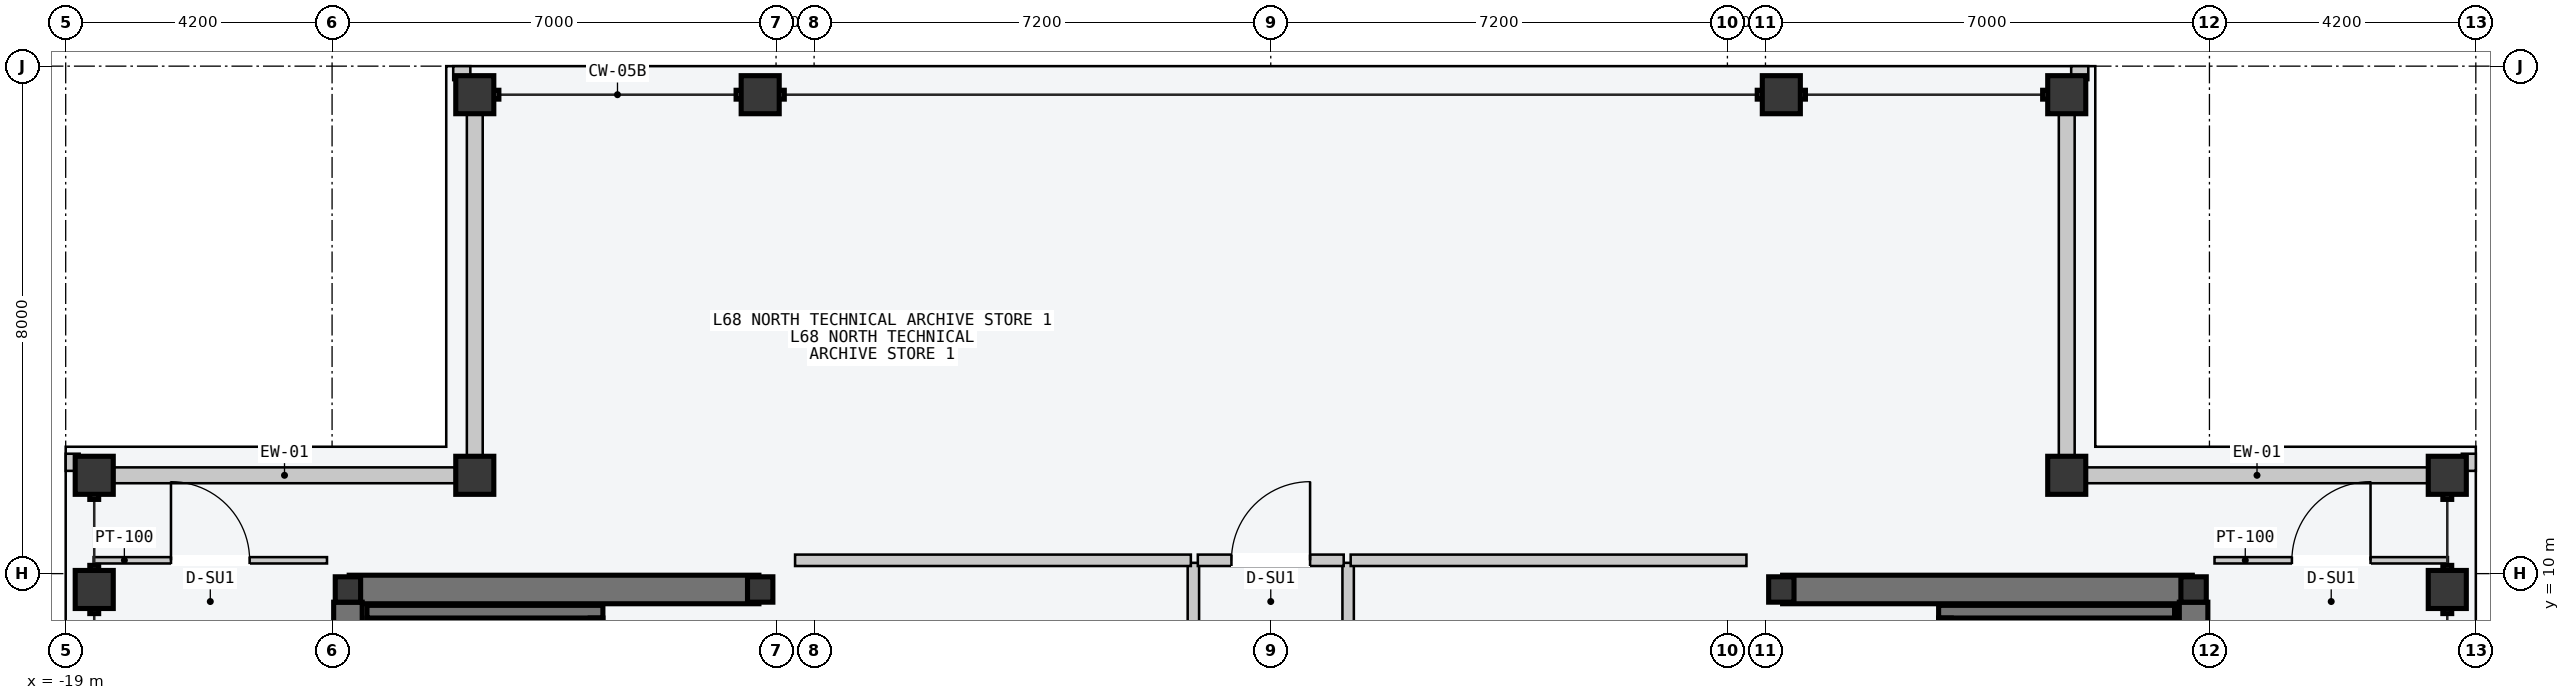
"""IFC4 building model, lengths in metres.
Left out: names, types, materials, properties, quantities, classifications, styles, units other than length and angle.
Written with IfcOpenShell. Run it as: python <this file> out.ifc"""

import sys

from ifc_helpers import new_model, si_unit, direction, frame, frame_2d, origin, origin_2d, place, context, subcontext, project, spatial, rectangle, hollow_rectangle, i_section, extrude, element, fill, save


model = new_model("IFC4")
c1 = context("Model", 3, precision=1e-05, world=origin(), true_north=direction((0.0, 1.0)))
c2 = subcontext(c1, "Body", "Model", "MODEL_VIEW")
j1 = project(units=[si_unit("LENGTHUNIT", "METRE"), si_unit("PLANEANGLEUNIT", "RADIAN")], contexts=[c1])
p1 = place(None, origin())
s1 = spatial("IfcSite", under=j1, at=p1, CompositionType="ELEMENT")
p2 = place(p1, origin())
s2 = spatial("IfcBuilding", under=s1, at=p2, CompositionType="ELEMENT")
p3 = place(p2, frame((0.0, 0.0, 258.0)))
s3 = spatial("IfcBuildingStorey", under=s2, at=p3, CompositionType="ELEMENT", Elevation=258.0)
p4 = place(p3, frame((-14.53, 9.75, -0.2), z_axis=(0.0, 0.0, 1.0), x_axis=(1.0, 0.0, 0.0)))
e1 = element("IfcWall", 1, at=p4, inside=s3, PredefinedType="SHEAR", context=c2, shape_type="SweptSolid", body=[
    extrude(rectangle(XDim=6.46, YDim=0.45, at=frame_2d((3.23, 0.0))), origin(), (0.0, 0.0, 1.0), 3.6),
])
p5 = place(p3, frame((-14.55, 0.2, -0.2), z_axis=(0.0, 0.0, 1.0), x_axis=(0.0, 1.0, 0.0)))
e2 = element("IfcWall", 2, at=p5, inside=s3, PredefinedType="SHEAR", context=c2, shape_type="SweptSolid", body=[
    extrude(rectangle(XDim=9.35, YDim=0.45, at=frame_2d((4.675, 0.0))), origin(), (0.0, 0.0, 1.0), 3.6),
])
p6 = place(p3, frame((8.07, 9.75, -0.2), z_axis=(0.0, 0.0, 1.0), x_axis=(1.0, 0.0, 0.0)))
e3 = element("IfcWall", 3, at=p6, inside=s3, PredefinedType="SHEAR", context=c2, shape_type="SweptSolid", body=[
    extrude(rectangle(XDim=6.46, YDim=0.45, at=frame_2d((3.23, 0.0))), origin(), (0.0, 0.0, 1.0), 3.6),
])
p7 = place(p3, frame((14.55, 0.2, -0.2), z_axis=(0.0, 0.0, 1.0), x_axis=(0.0, 1.0, 0.0)))
e4 = element("IfcWall", 4, at=p7, inside=s3, PredefinedType="SHEAR", context=c2, shape_type="SweptSolid", body=[
    extrude(rectangle(XDim=9.35, YDim=0.45, at=frame_2d((4.675, 0.0))), origin(), (0.0, 0.0, 1.0), 3.6),
])
for number, where, z_axis, x_axis in (
    (5, (-14.15, 1.5, -0.2), (0.0, 0.0, 1.0), (0.0, 1.0, 0.0)),
    (6, (14.15, 1.5, -0.2), (0.0, 0.0, 1.0), (0.0, 1.0, 0.0)),
):
    element("IfcWall", number, at=place(p3, frame(where, z_axis=z_axis, x_axis=x_axis)), inside=s3, PredefinedType="SOLIDWALL", context=c2, shape_type="SweptSolid", body=[
        extrude(rectangle(XDim=7.8, YDim=0.2, at=frame_2d((3.9, 0.0))), origin(), (0.0, 0.0, 1.0), 3.6),
    ])
p8 = place(p3, frame((-14.25, 9.4, -0.2), z_axis=(0.0, 0.0, 1.0), x_axis=(1.0, 0.0, 0.0)))
e7 = element("IfcWall", 7, at=p8, inside=s3, PredefinedType="SOLIDWALL", context=c2, shape_type="SweptSolid", body=[
    extrude(rectangle(XDim=3.72, YDim=0.2, at=frame_2d((1.86, 0.0))), origin(), (0.0, 0.0, 1.0), 3.6),
])
p9 = place(p3, frame((-10.63, 1.5, -0.2), z_axis=(0.0, 0.0, 1.0), x_axis=(0.0, 1.0, 0.0)))
e8 = element("IfcWall", 8, at=p9, inside=s3, PredefinedType="SOLIDWALL", context=c2, shape_type="SweptSolid", body=[
    extrude(rectangle(XDim=7.8, YDim=0.2, at=frame_2d((3.9, 0.0))), origin(), (0.0, 0.0, 1.0), 3.6),
])
p10 = place(p3, frame((10.53, 9.4, -0.2), z_axis=(0.0, 0.0, 1.0), x_axis=(1.0, 0.0, 0.0)))
e9 = element("IfcWall", 9, at=p10, inside=s3, PredefinedType="SOLIDWALL", context=c2, shape_type="SweptSolid", body=[
    extrude(rectangle(XDim=3.72, YDim=0.2, at=frame_2d((1.86, 0.0))), origin(), (0.0, 0.0, 1.0), 3.6),
])
p11 = place(p3, frame((10.63, 1.5, -0.2), z_axis=(0.0, 0.0, 1.0), x_axis=(0.0, 1.0, 0.0)))
e10 = element("IfcWall", 10, at=p11, inside=s3, PredefinedType="SOLIDWALL", context=c2, shape_type="SweptSolid", body=[
    extrude(rectangle(XDim=7.8, YDim=0.2, at=frame_2d((3.9, 0.0))), origin(), (0.0, 0.0, 1.0), 3.6),
])
for number, where, z_axis, x_axis in (
    (11, (-14.55, 9.75, 0.0), (0.0, 0.0, 1.0), (1.0, 0.0, 0.0)),
    (12, (-8.05, 9.75, 0.0), (0.0, 0.0, 1.0), (1.0, 0.0, 0.0)),
    (13, (8.05, 9.75, 0.0), (0.0, 0.0, 1.0), (1.0, 0.0, 0.0)),
    (14, (14.55, 9.75, 0.0), (0.0, 0.0, 1.0), (1.0, 0.0, 0.0)),
):
    element("IfcColumn", number, at=place(p3, frame(where, z_axis=z_axis, x_axis=x_axis)), inside=s3, PredefinedType="COLUMN", context=c2, shape_type="SweptSolid", body=[
        extrude(i_section(OverallWidth=0.4, OverallDepth=0.4, WebThickness=0.013, FlangeThickness=0.021, at=origin_2d()), origin(), (0.0, 0.0, 1.0), 3.6),
    ])
for number, where, z_axis, x_axis in (
    (15, (-12.55, 17.55, 0.0), (0.0, 0.0, 1.0), (1.0, 0.0, 0.0)),
    (16, (-8.05, 17.55, 0.0), (0.0, 0.0, 1.0), (1.0, 0.0, 0.0)),
    (17, (8.05, 17.55, 0.0), (0.0, 0.0, 1.0), (1.0, 0.0, 0.0)),
    (18, (12.55, 17.55, 0.0), (0.0, 0.0, 1.0), (1.0, 0.0, 0.0)),
    (19, (-18.55, 9.75, 0.0), (0.0, 0.0, 1.0), (0.0, 1.0, 0.0)),
    (20, (-18.55, 11.55, 0.0), (0.0, 0.0, 1.0), (0.0, 1.0, 0.0)),
    (21, (18.55, 9.75, 0.0), (0.0, 0.0, 1.0), (0.0, 1.0, 0.0)),
    (22, (18.55, 11.55, 0.0), (0.0, 0.0, 1.0), (0.0, 1.0, 0.0)),
    (23, (-12.55, 11.55, 0.0), (0.0, 0.0, 1.0), (1.0, 0.0, 0.0)),
    (24, (12.55, 11.55, 0.0), (0.0, 0.0, 1.0), (1.0, 0.0, 0.0)),
):
    element("IfcColumn", number, at=place(p3, frame(where, z_axis=z_axis, x_axis=x_axis)), inside=s3, PredefinedType="COLUMN", context=c2, shape_type="SweptSolid", body=[
        extrude(hollow_rectangle(XDim=0.6, YDim=0.6, WallThickness=0.025, at=origin_2d()), origin(), (0.0, 0.0, 1.0), 3.6),
    ])
for number, where, z_axis, x_axis in (
    (25, (-18.24, 11.55, 0.0), (0.0, 0.0, 1.0), (1.0, 0.0, 0.0)),
    (26, (-12.55, 11.86, 0.0), (0.0, 0.0, 1.0), (0.0, 1.0, 0.0)),
    (27, (12.86, 11.55, 0.0), (0.0, 0.0, 1.0), (1.0, 0.0, 0.0)),
    (28, (12.55, 11.86, 0.0), (0.0, 0.0, 1.0), (0.0, 1.0, 0.0)),
):
    element("IfcWall", number, at=place(p3, frame(where, z_axis=z_axis, x_axis=x_axis)), inside=s3, PredefinedType="STANDARD", context=c2, shape_type="SweptSolid", body=[
        extrude(rectangle(XDim=5.38, YDim=0.25, at=frame_2d((2.69, 0.0))), origin(), (0.0, 0.0, 1.0), 2.85),
    ])
for number, where, z_axis, x_axis in (
    (29, (-12.89, 17.89, 0.0), (0.0, 0.0, 1.0), (1.0, 0.0, 0.0)),
    (30, (-18.89, 11.62, 0.0), (0.0, 0.0, 1.0), (0.0, 1.0, 0.0)),
    (31, (12.62, 17.89, 0.0), (0.0, 0.0, 1.0), (1.0, 0.0, 0.0)),
    (32, (18.89, 11.62, 0.0), (0.0, 0.0, 1.0), (0.0, 1.0, 0.0)),
):
    element("IfcWall", number, at=place(p3, frame(where, z_axis=z_axis, x_axis=x_axis)), inside=s3, PredefinedType="PARAPET", context=c2, shape_type="SweptSolid", body=[
        extrude(rectangle(XDim=0.27, YDim=0.22, at=frame_2d((0.135, 0.0))), origin(), (0.0, 0.0, 1.0), 1.2),
    ])
p12 = place(p3, frame((-1.22, -3.5, 0.0), z_axis=(0.0, 0.0, 1.0), x_axis=(0.0, 1.0, 0.0)))
e33 = element("IfcWall", 33, at=p12, inside=s3, PredefinedType="PARTITIONING", context=c2, shape_type="SweptSolid", body=[
    extrude(rectangle(XDim=13.67, YDim=0.18, at=frame_2d((6.835, 0.0))), origin(), (0.0, 0.0, 1.0), 3.4),
])
p13 = place(p12, frame((6.1, 0.0, 0.0)))
e34 = element("IfcOpeningElement", 34, at=p13, cuts=e33, PredefinedType="OPENING", context=c2, shape_type="SweptSolid", body=[
    extrude(rectangle(XDim=1.24, YDim=2.24, at=frame_2d((0.62, 1.12))), frame((0.0, 0.1, 0.0), z_axis=(0.0, -1.0, 0.0), x_axis=(1.0, 0.0, 0.0)), (0.0, 0.0, 1.0), 0.2),
])
p14 = place(p12, frame((1.6, 0.0, 0.0)))
e35 = element("IfcOpeningElement", 35, at=p14, cuts=e33, PredefinedType="OPENING", context=c2, shape_type="SweptSolid", body=[
    extrude(rectangle(XDim=0.96, YDim=2.18, at=frame_2d((0.48, 1.09))), frame((0.0, 0.1, 0.0), z_axis=(0.0, -1.0, 0.0), x_axis=(1.0, 0.0, 0.0)), (0.0, 0.0, 1.0), 0.2),
])
p15 = place(p3, frame((-7.5, 10.21, 0.0), z_axis=(0.0, 0.0, 1.0), x_axis=(1.0, 0.0, 0.0)))
e36 = element("IfcWall", 36, at=p15, inside=s3, PredefinedType="PARTITIONING", context=c2, shape_type="SweptSolid", body=[
    extrude(rectangle(XDim=6.24, YDim=0.18, at=frame_2d((3.12, 0.0))), origin(), (0.0, 0.0, 1.0), 3.4),
])
p16 = place(p3, frame((1.22, -3.5, 0.0), z_axis=(0.0, 0.0, 1.0), x_axis=(0.0, 1.0, 0.0)))
e37 = element("IfcWall", 37, at=p16, inside=s3, PredefinedType="PARTITIONING", context=c2, shape_type="SweptSolid", body=[
    extrude(rectangle(XDim=13.67, YDim=0.18, at=frame_2d((6.835, 0.0))), origin(), (0.0, 0.0, 1.0), 3.4),
])
p17 = place(p16, frame((6.1, 0.0, 0.0)))
e38 = element("IfcOpeningElement", 38, at=p17, cuts=e37, PredefinedType="OPENING", context=c2, shape_type="SweptSolid", body=[
    extrude(rectangle(XDim=1.24, YDim=2.24, at=frame_2d((0.62, 1.12))), frame((0.0, 0.1, 0.0), z_axis=(0.0, -1.0, 0.0), x_axis=(1.0, 0.0, 0.0)), (0.0, 0.0, 1.0), 0.2),
])
p18 = place(p16, frame((1.6, 0.0, 0.0)))
e39 = element("IfcOpeningElement", 39, at=p18, cuts=e37, PredefinedType="OPENING", context=c2, shape_type="SweptSolid", body=[
    extrude(rectangle(XDim=0.96, YDim=2.18, at=frame_2d((0.48, 1.09))), frame((0.0, 0.1, 0.0), z_axis=(0.0, -1.0, 0.0), x_axis=(1.0, 0.0, 0.0)), (0.0, 0.0, 1.0), 0.2),
])
p19 = place(p3, frame((1.26, 10.21, 0.0), z_axis=(0.0, 0.0, 1.0), x_axis=(1.0, 0.0, 0.0)))
e40 = element("IfcWall", 40, at=p19, inside=s3, PredefinedType="PARTITIONING", context=c2, shape_type="SweptSolid", body=[
    extrude(rectangle(XDim=6.24, YDim=0.18, at=frame_2d((3.12, 0.0))), origin(), (0.0, 0.0, 1.0), 3.4),
])
p20 = place(p3, frame((-1.15, 10.21, 0.0), z_axis=(0.0, 0.0, 1.0), x_axis=(1.0, 0.0, 0.0)))
e41 = element("IfcWall", 41, at=p20, inside=s3, PredefinedType="PARTITIONING", context=c2, shape_type="SweptSolid", body=[
    extrude(rectangle(XDim=2.3, YDim=0.18, at=frame_2d((1.15, 0.0))), origin(), (0.0, 0.0, 1.0), 3.4),
])
p21 = place(p20, frame((0.53, 0.0, 0.0)))
e42 = element("IfcOpeningElement", 42, at=p21, cuts=e41, PredefinedType="OPENING", context=c2, shape_type="SweptSolid", body=[
    extrude(rectangle(XDim=1.24, YDim=2.24, at=frame_2d((0.62, 1.12))), frame((0.0, 0.1, 0.0), z_axis=(0.0, -1.0, 0.0), x_axis=(1.0, 0.0, 0.0)), (0.0, 0.0, 1.0), 0.2),
])
p22 = place(p3, frame((-18.56, 10.21, 0.0), z_axis=(0.0, 0.0, 1.0), x_axis=(1.0, 0.0, 0.0)))
e43 = element("IfcWall", 43, at=p22, inside=s3, PredefinedType="PARTITIONING", context=c2, shape_type="SweptSolid", body=[
    extrude(rectangle(XDim=3.68, YDim=0.1, at=frame_2d((1.84, 0.0))), origin(), (0.0, 0.0, 1.0), 3.4),
])
p23 = place(p22, frame((1.22, 0.0, 0.0)))
e44 = element("IfcOpeningElement", 44, at=p23, cuts=e43, PredefinedType="OPENING", context=c2, shape_type="SweptSolid", body=[
    extrude(rectangle(XDim=1.24, YDim=2.24, at=frame_2d((0.62, 1.12))), frame((0.0, 0.06, 0.0), z_axis=(0.0, -1.0, 0.0), x_axis=(1.0, 0.0, 0.0)), (0.0, 0.0, 1.0), 0.12),
])
p24 = place(p3, frame((14.88, 10.21, 0.0), z_axis=(0.0, 0.0, 1.0), x_axis=(1.0, 0.0, 0.0)))
e45 = element("IfcWall", 45, at=p24, inside=s3, PredefinedType="PARTITIONING", context=c2, shape_type="SweptSolid", body=[
    extrude(rectangle(XDim=3.68, YDim=0.1, at=frame_2d((1.84, 0.0))), origin(), (0.0, 0.0, 1.0), 3.4),
])
p25 = place(p24, frame((1.22, 0.0, 0.0)))
e46 = element("IfcOpeningElement", 46, at=p25, cuts=e45, PredefinedType="OPENING", context=c2, shape_type="SweptSolid", body=[
    extrude(rectangle(XDim=1.24, YDim=2.24, at=frame_2d((0.62, 1.12))), frame((0.0, 0.06, 0.0), z_axis=(0.0, -1.0, 0.0), x_axis=(1.0, 0.0, 0.0)), (0.0, 0.0, 1.0), 0.12),
])
p26 = place(p21, origin())
e47 = element("IfcDoor", 47, at=p26, inside=s3, OperationType="SINGLE_SWING_RIGHT", PredefinedType="DOOR", context=c2, shape_type="SweptSolid", body=[
    extrude(rectangle(XDim=1.24, YDim=2.24, at=frame_2d((0.62, 1.12))), frame((0.0, 0.025, 0.0), z_axis=(0.0, -1.0, 0.0), x_axis=(1.0, 0.0, 0.0)), (0.0, 0.0, 1.0), 0.05),
])
fill(e42, e47)
p27 = place(p23, origin())
e48 = element("IfcDoor", 48, at=p27, inside=s3, OperationType="SINGLE_SWING_LEFT", PredefinedType="DOOR", context=c2, shape_type="SweptSolid", body=[
    extrude(rectangle(XDim=1.24, YDim=2.24, at=frame_2d((0.62, 1.12))), frame((0.0, 0.025, 0.0), z_axis=(0.0, -1.0, 0.0), x_axis=(1.0, 0.0, 0.0)), (0.0, 0.0, 1.0), 0.05),
])
fill(e44, e48)
p28 = place(p25, origin())
e49 = element("IfcDoor", 49, at=p28, inside=s3, OperationType="SINGLE_SWING_RIGHT", PredefinedType="DOOR", context=c2, shape_type="SweptSolid", body=[
    extrude(rectangle(XDim=1.24, YDim=2.24, at=frame_2d((0.62, 1.12))), frame((0.0, 0.025, 0.0), z_axis=(0.0, -1.0, 0.0), x_axis=(1.0, 0.0, 0.0)), (0.0, 0.0, 1.0), 0.05),
])
fill(e46, e49)
save(model, sys.argv[1])
